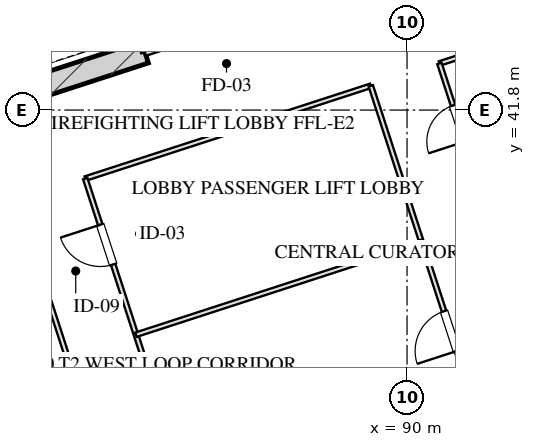
"""IFC4 building model, lengths in metres.
Left out: names, types, materials, properties, quantities, classifications, styles, units other than length and angle.
Written with IfcOpenShell. Run it as: python <this file> out.ifc"""

import sys

from ifc_helpers import new_model, si_unit, direction, frame, frame_2d, origin, place, context, subcontext, project, spatial, rectangle, extrude, element, fill, save


model = new_model("IFC4")
c1 = context("Model", 3, precision=1e-05, world=origin(), true_north=direction((0.0, 1.0)))
c2 = subcontext(c1, "Body", "Model", "MODEL_VIEW")
j1 = project(units=[si_unit("LENGTHUNIT", "METRE"), si_unit("PLANEANGLEUNIT", "RADIAN")], contexts=[c1])
p1 = place(None, origin())
s1 = spatial("IfcSite", under=j1, at=p1, CompositionType="ELEMENT")
p2 = place(p1, origin())
s2 = spatial("IfcBuilding", under=s1, at=p2, CompositionType="ELEMENT")
p3 = place(p2, frame((0.0, 0.0, 117.3)))
s3 = spatial("IfcBuildingStorey", under=s2, at=p3, CompositionType="ELEMENT", Elevation=117.3)
p4 = place(p3, frame((79.087, 42.021, 0.0), z_axis=(0.0, 0.0, 1.0), x_axis=(0.951062550203, 0.3089984233, 0.0)))
e1 = element("IfcWall", 1, at=p4, inside=s3, PredefinedType="SHEAR", context=c2, shape_type="SweptSolid", body=[
    extrude(rectangle(XDim=4.22, YDim=0.6, at=frame_2d((2.11, 0.0))), origin(), (0.0, 0.0, 1.0), 3.45),
])
p5 = place(p3, frame((80.716, 6.59, 0.0), z_axis=(0.0, 0.0, 1.0), x_axis=(-0.309017542002, 0.95105633836, 0.0)))
e2 = element("IfcWall", 2, at=p5, inside=s3, PredefinedType="SOLIDWALL", context=c2, shape_type="SweptSolid", body=[
    extrude(rectangle(XDim=46.4, YDim=0.4, at=frame_2d((23.2, 0.0))), origin(), (0.0, 0.0, 1.0), 2.61),
])
p6 = place(p5, frame((15.6, 0.0, 0.75)))
e3 = element("IfcOpeningElement", 3, at=p6, cuts=e2, PredefinedType="OPENING", context=c2, shape_type="SweptSolid", body=[
    extrude(rectangle(XDim=2.4, YDim=1.46, at=frame_2d((1.2, 0.73))), frame((0.0, 0.21, 0.0), z_axis=(0.0, -1.0, 0.0), x_axis=(1.0, 0.0, 0.0)), (0.0, 0.0, 1.0), 0.42),
])
p7 = place(p5, frame((28.4, 0.0, 0.75)))
e4 = element("IfcOpeningElement", 4, at=p7, cuts=e2, PredefinedType="OPENING", context=c2, shape_type="SweptSolid", body=[
    extrude(rectangle(XDim=2.4, YDim=1.46, at=frame_2d((1.2, 0.73))), frame((0.0, 0.21, 0.0), z_axis=(0.0, -1.0, 0.0), x_axis=(1.0, 0.0, 0.0)), (0.0, 0.0, 1.0), 0.42),
])
p8 = place(p3, frame((83.101, 43.324, 0.0), z_axis=(0.0, 0.0, 1.0), x_axis=(-0.309048298632, 0.951046344356, 0.0)))
e5 = element("IfcWall", 5, at=p8, inside=s3, PredefinedType="PARTITIONING", context=c2, shape_type="SweptSolid", body=[
    extrude(rectangle(XDim=1.9, YDim=0.2, at=frame_2d((0.95, 0.0))), origin(), (0.0, 0.0, 1.0), 3.175),
])
p9 = place(p8, frame((0.52, 0.0, 0.0)))
e6 = element("IfcOpeningElement", 6, at=p9, cuts=e5, PredefinedType="OPENING", context=c2, shape_type="SweptSolid", body=[
    extrude(rectangle(XDim=1.1, YDim=2.05, at=frame_2d((0.55, 1.025))), frame((0.0, 0.11, 0.0), z_axis=(0.0, -1.0, 0.0), x_axis=(1.0, 0.0, 0.0)), (0.0, 0.0, 1.0), 0.22),
])
p10 = place(p3, frame((83.101, 43.324, 0.0), z_axis=(0.0, 0.0, 1.0), x_axis=(0.951052804469, 0.309028417967, 0.0)))
e7 = element("IfcWall", 7, at=p10, inside=s3, PredefinedType="PARTITIONING", context=c2, shape_type="SweptSolid", body=[
    extrude(rectangle(XDim=3.83, YDim=0.2, at=frame_2d((1.915, 0.0))), origin(), (0.0, 0.0, 1.0), 3.175),
])
p11 = place(p10, frame((1.35, 0.0, 0.0)))
e8 = element("IfcOpeningElement", 8, at=p11, cuts=e7, PredefinedType="OPENING", context=c2, shape_type="SweptSolid", body=[
    extrude(rectangle(XDim=1.2, YDim=2.05, at=frame_2d((0.6, 1.025))), frame((0.0, 0.11, 0.0), z_axis=(0.0, -1.0, 0.0), x_axis=(1.0, 0.0, 0.0)), (0.0, 0.0, 1.0), 0.22),
])
p12 = place(p3, frame((81.532, 39.997, 0.0), z_axis=(0.0, 0.0, 1.0), x_axis=(0.951048148493, 0.309042746635, 0.0)))
e9 = element("IfcWall", 9, at=p12, inside=s3, PredefinedType="PARTITIONING", context=c2, shape_type="SweptSolid", body=[
    extrude(rectangle(XDim=7.9, YDim=0.12, at=frame_2d((3.95, 0.0))), origin(), (0.0, 0.0, 1.0), 3.175),
])
p13 = place(p3, frame((90.853, 43.025, 0.0), z_axis=(0.0, 0.0, 1.0), x_axis=(0.951054001411, 0.309024734286, 0.0)))
e10 = element("IfcWall", 10, at=p13, inside=s3, PredefinedType="PARTITIONING", context=c2, shape_type="SweptSolid", body=[
    extrude(rectangle(XDim=13.5, YDim=0.12, at=frame_2d((6.75, 0.0))), origin(), (0.0, 0.0, 1.0), 3.175),
])
p14 = place(p3, frame((84.867, 23.584, 0.0), z_axis=(0.0, 0.0, 1.0), x_axis=(-0.309022042254, 0.951054876125, 0.0)))
e11 = element("IfcWall", 11, at=p14, inside=s3, PredefinedType="PARTITIONING", context=c2, shape_type="SweptSolid", body=[
    extrude(rectangle(XDim=16.64, YDim=0.12, at=frame_2d((8.32, 0.0))), origin(), (0.0, 0.0, 1.0), 3.175),
])
p15 = place(p14, frame((3.06, 0.0, 0.0)))
e12 = element("IfcOpeningElement", 12, at=p15, cuts=e11, PredefinedType="OPENING", context=c2, shape_type="SweptSolid", body=[
    extrude(rectangle(XDim=1.0, YDim=2.05, at=frame_2d((0.5, 1.025))), frame((0.0, 0.07, 0.0), z_axis=(0.0, -1.0, 0.0), x_axis=(1.0, 0.0, 0.0)), (0.0, 0.0, 1.0), 0.14),
])
p16 = place(p14, frame((9.22, 0.0, 0.0)))
e13 = element("IfcOpeningElement", 13, at=p16, cuts=e11, PredefinedType="OPENING", context=c2, shape_type="SweptSolid", body=[
    extrude(rectangle(XDim=1.0, YDim=2.05, at=frame_2d((0.5, 1.025))), frame((0.0, 0.07, 0.0), z_axis=(0.0, -1.0, 0.0), x_axis=(1.0, 0.0, 0.0)), (0.0, 0.0, 1.0), 0.14),
])
p17 = place(p14, frame((13.98, 0.0, 0.0)))
e14 = element("IfcOpeningElement", 14, at=p17, cuts=e11, PredefinedType="OPENING", context=c2, shape_type="SweptSolid", body=[
    extrude(rectangle(XDim=0.85, YDim=2.05, at=frame_2d((0.425, 1.025))), frame((0.0, 0.07, 0.0), z_axis=(0.0, -1.0, 0.0), x_axis=(1.0, 0.0, 0.0)), (0.0, 0.0, 1.0), 0.14),
])
p18 = place(p3, frame((86.675, 24.171, 0.0), z_axis=(0.0, 0.0, 1.0), x_axis=(-0.309022042254, 0.951054876125, 0.0)))
e15 = element("IfcWall", 15, at=p18, inside=s3, PredefinedType="PARTITIONING", context=c2, shape_type="SweptSolid", body=[
    extrude(rectangle(XDim=16.64, YDim=0.12, at=frame_2d((8.32, 0.0))), origin(), (0.0, 0.0, 1.0), 3.175),
])
p19 = place(p18, frame((3.204, 0.0, 0.0)))
e16 = element("IfcOpeningElement", 16, at=p19, cuts=e15, PredefinedType="OPENING", context=c2, shape_type="SweptSolid", body=[
    extrude(rectangle(XDim=1.1, YDim=2.05, at=frame_2d((0.55, 1.025))), frame((0.0, 0.07, 0.0), z_axis=(0.0, -1.0, 0.0), x_axis=(1.0, 0.0, 0.0)), (0.0, 0.0, 1.0), 0.14),
])
p20 = place(p18, frame((14.264, 0.0, 0.0)))
e17 = element("IfcOpeningElement", 17, at=p20, cuts=e15, PredefinedType="OPENING", context=c2, shape_type="SweptSolid", body=[
    extrude(rectangle(XDim=1.1, YDim=2.05, at=frame_2d((0.55, 1.025))), frame((0.0, 0.07, 0.0), z_axis=(0.0, -1.0, 0.0), x_axis=(1.0, 0.0, 0.0)), (0.0, 0.0, 1.0), 0.14),
])
p21 = place(p3, frame((94.188, 26.613, 0.0), z_axis=(0.0, 0.0, 1.0), x_axis=(-0.30901773025, 0.951056277195, 0.0)))
e18 = element("IfcWall", 18, at=p21, inside=s3, PredefinedType="PARTITIONING", context=c2, shape_type="SweptSolid", body=[
    extrude(rectangle(XDim=16.64, YDim=0.12, at=frame_2d((8.32, 0.0))), origin(), (0.0, 0.0, 1.0), 3.175),
])
p22 = place(p21, frame((9.304, 0.0, 0.0)))
e19 = element("IfcOpeningElement", 19, at=p22, cuts=e18, PredefinedType="OPENING", context=c2, shape_type="SweptSolid", body=[
    extrude(rectangle(XDim=1.1, YDim=2.05, at=frame_2d((0.55, 1.025))), frame((0.0, 0.07, 0.0), z_axis=(0.0, -1.0, 0.0), x_axis=(1.0, 0.0, 0.0)), (0.0, 0.0, 1.0), 0.14),
])
p23 = place(p3, frame((95.995, 27.2, 0.0), z_axis=(0.0, 0.0, 1.0), x_axis=(-0.309022042254, 0.951054876125, 0.0)))
e20 = element("IfcWall", 20, at=p23, inside=s3, PredefinedType="PARTITIONING", context=c2, shape_type="SweptSolid", body=[
    extrude(rectangle(XDim=16.64, YDim=0.12, at=frame_2d((8.32, 0.0))), origin(), (0.0, 0.0, 1.0), 3.175),
])
p24 = place(p23, frame((1.16, 0.0, 0.0)))
e21 = element("IfcOpeningElement", 21, at=p24, cuts=e20, PredefinedType="OPENING", context=c2, shape_type="SweptSolid", body=[
    extrude(rectangle(XDim=1.0, YDim=2.05, at=frame_2d((0.5, 1.025))), frame((0.0, 0.07, 0.0), z_axis=(0.0, -1.0, 0.0), x_axis=(1.0, 0.0, 0.0)), (0.0, 0.0, 1.0), 0.14),
])
p25 = place(p23, frame((5.48, 0.0, 0.0)))
e22 = element("IfcOpeningElement", 22, at=p25, cuts=e20, PredefinedType="OPENING", context=c2, shape_type="SweptSolid", body=[
    extrude(rectangle(XDim=1.0, YDim=2.05, at=frame_2d((0.5, 1.025))), frame((0.0, 0.07, 0.0), z_axis=(0.0, -1.0, 0.0), x_axis=(1.0, 0.0, 0.0)), (0.0, 0.0, 1.0), 0.14),
])
p26 = place(p23, frame((9.48, 0.0, 0.0)))
e23 = element("IfcOpeningElement", 23, at=p26, cuts=e20, PredefinedType="OPENING", context=c2, shape_type="SweptSolid", body=[
    extrude(rectangle(XDim=1.0, YDim=2.05, at=frame_2d((0.5, 1.025))), frame((0.0, 0.07, 0.0), z_axis=(0.0, -1.0, 0.0), x_axis=(1.0, 0.0, 0.0)), (0.0, 0.0, 1.0), 0.14),
])
p27 = place(p23, frame((14.48, 0.0, 0.0)))
e24 = element("IfcOpeningElement", 24, at=p27, cuts=e20, PredefinedType="OPENING", context=c2, shape_type="SweptSolid", body=[
    extrude(rectangle(XDim=1.0, YDim=2.05, at=frame_2d((0.5, 1.025))), frame((0.0, 0.07, 0.0), z_axis=(0.0, -1.0, 0.0), x_axis=(1.0, 0.0, 0.0)), (0.0, 0.0, 1.0), 0.14),
])
p28 = place(p3, frame((82.867, 35.888, 0.0), z_axis=(0.0, 0.0, 1.0), x_axis=(0.951057231385, 0.309014793547, 0.0)))
e25 = element("IfcWall", 25, at=p28, inside=s3, PredefinedType="PARTITIONING", context=c2, shape_type="SweptSolid", body=[
    extrude(rectangle(XDim=7.9, YDim=0.12, at=frame_2d((3.95, 0.0))), origin(), (0.0, 0.0, 1.0), 3.175),
])
p29 = place(p3, frame((72.501, 32.52, 0.0), z_axis=(0.0, 0.0, 1.0), x_axis=(0.951051410833, 0.309032706929, 0.0)))
e26 = element("IfcWall", 26, at=p29, inside=s3, PredefinedType="PARTITIONING", context=c2, shape_type="SweptSolid", body=[
    extrude(rectangle(XDim=9.0, YDim=0.12, at=frame_2d((4.5, 0.0))), origin(), (0.0, 0.0, 1.0), 3.175),
])
p30 = place(p20, origin())
e27 = element("IfcDoor", 27, at=p30, inside=s3, OperationType="SINGLE_SWING_RIGHT", PredefinedType="DOOR", context=c2, shape_type="SweptSolid", body=[
    extrude(rectangle(XDim=1.1, YDim=2.05, at=frame_2d((0.55, 1.025))), frame((0.0, 0.025, 0.0), z_axis=(0.0, -1.0, 0.0), x_axis=(1.0, 0.0, 0.0)), (0.0, 0.0, 1.0), 0.05),
])
fill(e17, e27)
p31 = place(p22, origin())
e28 = element("IfcDoor", 28, at=p31, inside=s3, OperationType="SINGLE_SWING_LEFT", PredefinedType="DOOR", context=c2, shape_type="SweptSolid", body=[
    extrude(rectangle(XDim=1.1, YDim=2.05, at=frame_2d((0.55, 1.025))), frame((0.0, 0.025, 0.0), z_axis=(0.0, -1.0, 0.0), x_axis=(1.0, 0.0, 0.0)), (0.0, 0.0, 1.0), 0.05),
])
fill(e19, e28)
p32 = place(p27, origin())
e29 = element("IfcDoor", 29, at=p32, inside=s3, OperationType="SINGLE_SWING_LEFT", PredefinedType="DOOR", context=c2, shape_type="SweptSolid", body=[
    extrude(rectangle(XDim=1.0, YDim=2.05, at=frame_2d((0.5, 1.025))), frame((0.0, 0.025, 0.0), z_axis=(0.0, -1.0, 0.0), x_axis=(1.0, 0.0, 0.0)), (0.0, 0.0, 1.0), 0.05),
])
fill(e24, e29)
save(model, sys.argv[1])
